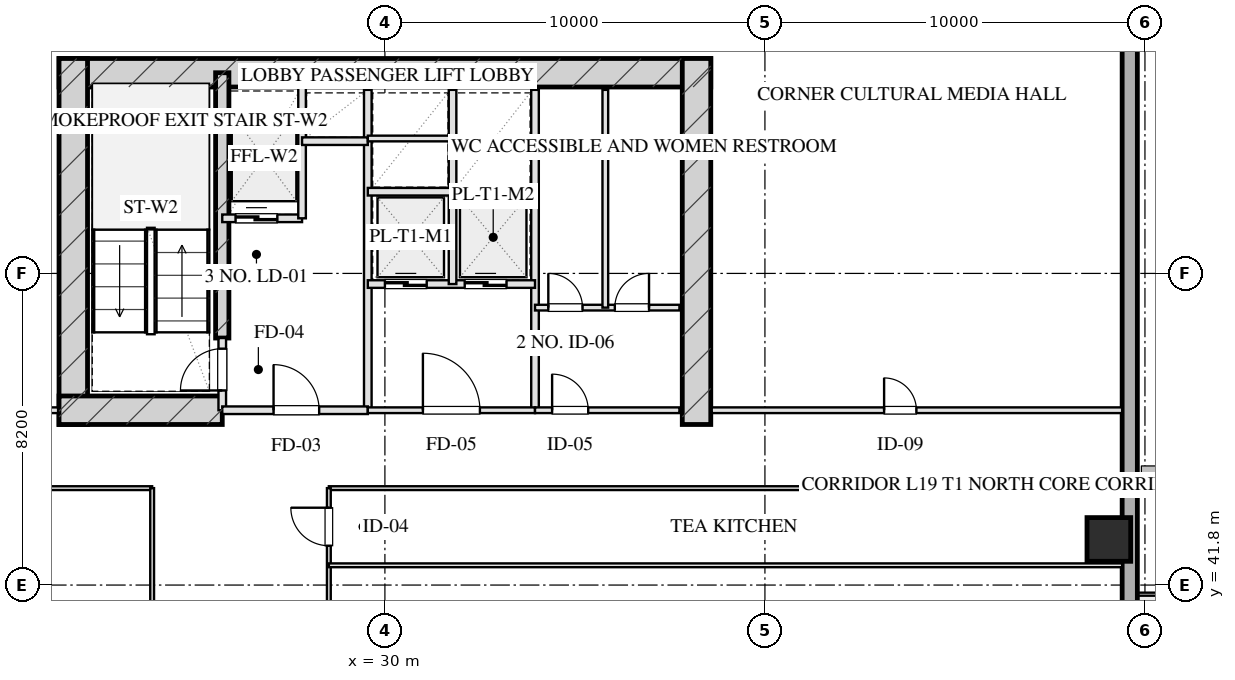
"""IFC4 building model, lengths in metres.
Left out: names, types, materials, properties, quantities, classifications, styles, units other than length and angle.
Written with IfcOpenShell. Run it as: python <this file> out.ifc"""

import sys

from ifc_helpers import new_model, si_unit, direction, frame, frame_2d, origin, origin_2d, place, context, subcontext, project, spatial, rectangle, hollow_rectangle, extrude, element, fill, save


model = new_model("IFC4")
c1 = context("Model", 3, precision=1e-05, world=origin(), true_north=direction((0.0, 1.0)))
c2 = subcontext(c1, "Body", "Model", "MODEL_VIEW")
j1 = project(units=[si_unit("LENGTHUNIT", "METRE"), si_unit("PLANEANGLEUNIT", "RADIAN")], contexts=[c1])
p1 = place(None, origin())
s1 = spatial("IfcSite", under=j1, at=p1, CompositionType="ELEMENT")
p2 = place(p1, origin())
s2 = spatial("IfcBuilding", under=s1, at=p2, CompositionType="ELEMENT")
p3 = place(p2, frame((0.0, 0.0, 78.2)))
s3 = spatial("IfcBuildingStorey", under=s2, at=p3, CompositionType="ELEMENT", Elevation=78.2)
p4 = place(p3, frame((21.425, 55.28, 0.0), z_axis=(0.0, 0.0, 1.0), x_axis=(1.0, 0.0, 0.0)))
e1 = element("IfcWall", 1, at=p4, inside=s3, PredefinedType="SHEAR", context=c2, shape_type="SweptSolid", body=[
    extrude(rectangle(XDim=17.15, YDim=0.75, at=frame_2d((8.575, 0.0))), origin(), (0.0, 0.0, 1.0), 3.45),
])
for number, where, z_axis, x_axis in (
    (2, (21.8, 46.025, 0.0), (0.0, 0.0, 1.0), (0.0, 1.0, 0.0)),
    (3, (38.2, 46.025, 0.0), (0.0, 0.0, 1.0), (0.0, 1.0, 0.0)),
):
    element("IfcWall", number, at=place(p3, frame(where, z_axis=z_axis, x_axis=x_axis)), inside=s3, PredefinedType="SHEAR", context=c2, shape_type="SweptSolid", body=[
        extrude(rectangle(XDim=9.63, YDim=0.75, at=frame_2d((4.815, 0.0))), origin(), (0.0, 0.0, 1.0), 3.45),
    ])
p5 = place(p3, frame((25.72, 48.3, 0.0), z_axis=(0.0, 0.0, 1.0), x_axis=(0.0, 1.0, 0.0)))
e4 = element("IfcWall", 4, at=p5, inside=s3, PredefinedType="SHEAR", context=c2, shape_type="SweptSolid", body=[
    extrude(rectangle(XDim=6.98, YDim=0.35, at=frame_2d((3.49, 0.0))), origin(), (0.0, 0.0, 1.0), 3.45),
])
p6 = place(p3, frame((21.425, 46.4, 0.0), z_axis=(0.0, 0.0, 1.0), x_axis=(1.0, 0.0, 0.0)))
e5 = element("IfcWall", 5, at=p6, inside=s3, PredefinedType="SHEAR", context=c2, shape_type="SweptSolid", body=[
    extrude(rectangle(XDim=4.295, YDim=0.75, at=frame_2d((2.147, 0.0))), origin(), (0.0, 0.0, 1.0), 3.45),
])
p7 = place(p3, frame((49.05, 43.0, 0.0), z_axis=(0.0, 0.0, 1.0), x_axis=(1.0, 0.0, 0.0)))
e6 = element("IfcColumn", 6, at=p7, inside=s3, PredefinedType="COLUMN", context=c2, shape_type="SweptSolid", body=[
    extrude(hollow_rectangle(XDim=1.15, YDim=1.15, WallThickness=0.04, at=origin_2d()), origin(), (0.0, 0.0, 1.0), 3.451),
])
p8 = place(p3, frame((49.6, 60.8, 0.0), z_axis=(0.0, 0.0, 1.0), x_axis=(0.0, -1.0, 0.0)))
e7 = element("IfcWall", 7, at=p8, inside=s3, PredefinedType="SOLIDWALL", context=c2, shape_type="SweptSolid", body=[
    extrude(rectangle(XDim=53.6, YDim=0.4, at=frame_2d((26.8, 0.0))), origin(), (0.0, 0.0, 1.0), 2.61),
])
p9 = place(p8, frame((20.45, 0.0, 0.0)))
e8 = element("IfcOpeningElement", 8, at=p9, cuts=e7, PredefinedType="OPENING", context=c2, shape_type="SweptSolid", body=[
    extrude(rectangle(XDim=1.1, YDim=2.15, at=frame_2d((0.55, 1.075))), frame((0.0, 0.21, 0.0), z_axis=(0.0, -1.0, 0.0), x_axis=(1.0, 0.0, 0.0)), (0.0, 0.0, 1.0), 0.42),
])
p10 = place(p3, frame((25.72, 46.4, 0.0), z_axis=(0.0, 0.0, 1.0), x_axis=(0.0, 1.0, 0.0)))
e9 = element("IfcWall", 9, at=p10, inside=s3, PredefinedType="PARTITIONING", context=c2, shape_type="SweptSolid", body=[
    extrude(rectangle(XDim=1.9, YDim=0.2, at=frame_2d((0.95, 0.0))), origin(), (0.0, 0.0, 1.0), 3.175),
])
p11 = place(p10, frame((0.52, 0.0, 0.0)))
e10 = element("IfcOpeningElement", 10, at=p11, cuts=e9, PredefinedType="OPENING", context=c2, shape_type="SweptSolid", body=[
    extrude(rectangle(XDim=1.1, YDim=2.05, at=frame_2d((0.55, 1.025))), frame((0.0, 0.11, 0.0), z_axis=(0.0, -1.0, 0.0), x_axis=(1.0, 0.0, 0.0)), (0.0, 0.0, 1.0), 0.22),
])
p12 = place(p3, frame((29.55, 46.4, 0.0), z_axis=(0.0, 0.0, 1.0), x_axis=(0.0, 1.0, 0.0)))
e11 = element("IfcWall", 11, at=p12, inside=s3, PredefinedType="PARTITIONING", context=c2, shape_type="SweptSolid", body=[
    extrude(rectangle(XDim=8.43, YDim=0.2, at=frame_2d((4.215, 0.0))), origin(), (0.0, 0.0, 1.0), 3.175),
])
p13 = place(p3, frame((25.72, 46.4, 0.0), z_axis=(0.0, 0.0, 1.0), x_axis=(1.0, 0.0, 0.0)))
e12 = element("IfcWall", 12, at=p13, inside=s3, PredefinedType="PARTITIONING", context=c2, shape_type="SweptSolid", body=[
    extrude(rectangle(XDim=3.83, YDim=0.2, at=frame_2d((1.915, 0.0))), origin(), (0.0, 0.0, 1.0), 3.175),
])
p14 = place(p13, frame((1.35, 0.0, 0.0)))
e13 = element("IfcOpeningElement", 13, at=p14, cuts=e12, PredefinedType="OPENING", context=c2, shape_type="SweptSolid", body=[
    extrude(rectangle(XDim=1.2, YDim=2.05, at=frame_2d((0.6, 1.025))), frame((0.0, 0.11, 0.0), z_axis=(0.0, -1.0, 0.0), x_axis=(1.0, 0.0, 0.0)), (0.0, 0.0, 1.0), 0.22),
])
p15 = place(p3, frame((25.72, 51.45, 0.0), z_axis=(0.0, 0.0, 1.0), x_axis=(1.0, 0.0, 0.0)))
e14 = element("IfcWall", 14, at=p15, inside=s3, PredefinedType="PARTITIONING", context=c2, shape_type="SweptSolid", body=[
    extrude(rectangle(XDim=2.1, YDim=0.2, at=frame_2d((1.05, 0.0))), origin(), (0.0, 0.0, 1.0), 3.175),
])
p16 = place(p15, frame((0.35, 0.0, 0.0)))
e15 = element("IfcOpeningElement", 15, at=p16, cuts=e14, PredefinedType="OPENING", context=c2, shape_type="SweptSolid", body=[
    extrude(rectangle(XDim=1.1, YDim=2.05, at=frame_2d((0.55, 1.025))), frame((0.0, 0.11, 0.0), z_axis=(0.0, -1.0, 0.0), x_axis=(1.0, 0.0, 0.0)), (0.0, 0.0, 1.0), 0.22),
])
p17 = place(p3, frame((27.82, 51.45, 0.0), z_axis=(0.0, 0.0, 1.0), x_axis=(0.0, 1.0, 0.0)))
e16 = element("IfcWall", 16, at=p17, inside=s3, PredefinedType="PARTITIONING", context=c2, shape_type="SweptSolid", body=[
    extrude(rectangle(XDim=3.7, YDim=0.2, at=frame_2d((1.85, 0.0))), origin(), (0.0, 0.0, 1.0), 3.175),
])
p18 = place(p3, frame((27.82, 53.48, 0.0), z_axis=(0.0, 0.0, 1.0), x_axis=(1.0, 0.0, 0.0)))
e17 = element("IfcWall", 17, at=p18, inside=s3, PredefinedType="PARTITIONING", context=c2, shape_type="SweptSolid", body=[
    extrude(rectangle(XDim=1.73, YDim=0.2, at=frame_2d((0.865, 0.0))), origin(), (0.0, 0.0, 1.0), 3.175),
])
p19 = place(p3, frame((33.95, 46.4, 0.0), z_axis=(0.0, 0.0, 1.0), x_axis=(0.0, 1.0, 0.0)))
e18 = element("IfcWall", 18, at=p19, inside=s3, PredefinedType="PARTITIONING", context=c2, shape_type="SweptSolid", body=[
    extrude(rectangle(XDim=8.43, YDim=0.2, at=frame_2d((4.215, 0.0))), origin(), (0.0, 0.0, 1.0), 3.175),
])
p20 = place(p3, frame((29.55, 46.4, 0.0), z_axis=(0.0, 0.0, 1.0), x_axis=(1.0, 0.0, 0.0)))
e19 = element("IfcWall", 19, at=p20, inside=s3, PredefinedType="PARTITIONING", context=c2, shape_type="SweptSolid", body=[
    extrude(rectangle(XDim=4.4, YDim=0.15, at=frame_2d((2.2, 0.0))), origin(), (0.0, 0.0, 1.0), 3.175),
])
p21 = place(p20, frame((1.45, 0.0, 0.0)))
e20 = element("IfcOpeningElement", 20, at=p21, cuts=e19, PredefinedType="OPENING", context=c2, shape_type="SweptSolid", body=[
    extrude(rectangle(XDim=1.5, YDim=2.05, at=frame_2d((0.75, 1.025))), frame((0.0, 0.085, 0.0), z_axis=(0.0, -1.0, 0.0), x_axis=(1.0, 0.0, 0.0)), (0.0, 0.0, 1.0), 0.17),
])
p22 = place(p3, frame((29.55, 49.72, 0.0), z_axis=(0.0, 0.0, 1.0), x_axis=(1.0, 0.0, 0.0)))
e21 = element("IfcWall", 21, at=p22, inside=s3, PredefinedType="PARTITIONING", context=c2, shape_type="SweptSolid", body=[
    extrude(rectangle(XDim=4.4, YDim=0.2, at=frame_2d((2.2, 0.0))), origin(), (0.0, 0.0, 1.0), 3.175),
])
p23 = place(p22, frame((0.45, 0.0, 0.0)))
e22 = element("IfcOpeningElement", 22, at=p23, cuts=e21, PredefinedType="OPENING", context=c2, shape_type="SweptSolid", body=[
    extrude(rectangle(XDim=1.1, YDim=2.05, at=frame_2d((0.55, 1.025))), frame((0.0, 0.11, 0.0), z_axis=(0.0, -1.0, 0.0), x_axis=(1.0, 0.0, 0.0)), (0.0, 0.0, 1.0), 0.22),
])
p24 = place(p22, frame((2.55, 0.0, 0.0)))
e23 = element("IfcOpeningElement", 23, at=p24, cuts=e21, PredefinedType="OPENING", context=c2, shape_type="SweptSolid", body=[
    extrude(rectangle(XDim=1.1, YDim=2.05, at=frame_2d((0.55, 1.025))), frame((0.0, 0.11, 0.0), z_axis=(0.0, -1.0, 0.0), x_axis=(1.0, 0.0, 0.0)), (0.0, 0.0, 1.0), 0.22),
])
p25 = place(p3, frame((31.78, 49.72, 0.0), z_axis=(0.0, 0.0, 1.0), x_axis=(0.0, 1.0, 0.0)))
e24 = element("IfcWall", 24, at=p25, inside=s3, PredefinedType="PARTITIONING", context=c2, shape_type="SweptSolid", body=[
    extrude(rectangle(XDim=5.11, YDim=0.2, at=frame_2d((2.555, 0.0))), origin(), (0.0, 0.0, 1.0), 3.175),
])
p26 = place(p3, frame((29.55, 52.15, 0.0), z_axis=(0.0, 0.0, 1.0), x_axis=(1.0, 0.0, 0.0)))
e25 = element("IfcWall", 25, at=p26, inside=s3, PredefinedType="PARTITIONING", context=c2, shape_type="SweptSolid", body=[
    extrude(rectangle(XDim=4.4, YDim=0.2, at=frame_2d((2.2, 0.0))), origin(), (0.0, 0.0, 1.0), 3.175),
])
p27 = place(p3, frame((29.55, 53.55, 0.0), z_axis=(0.0, 0.0, 1.0), x_axis=(1.0, 0.0, 0.0)))
e26 = element("IfcWall", 26, at=p27, inside=s3, PredefinedType="PARTITIONING", context=c2, shape_type="SweptSolid", body=[
    extrude(rectangle(XDim=2.23, YDim=0.15, at=frame_2d((1.115, 0.0))), origin(), (0.0, 0.0, 1.0), 3.175),
])
p28 = place(p3, frame((33.95, 46.4, 0.0), z_axis=(0.0, 0.0, 1.0), x_axis=(1.0, 0.0, 0.0)))
e27 = element("IfcWall", 27, at=p28, inside=s3, PredefinedType="PARTITIONING", context=c2, shape_type="SweptSolid", body=[
    extrude(rectangle(XDim=3.8, YDim=0.15, at=frame_2d((1.9, 0.0))), origin(), (0.0, 0.0, 1.0), 3.175),
])
p29 = place(p28, frame((0.45, 0.0, 0.0)))
e28 = element("IfcOpeningElement", 28, at=p29, cuts=e27, PredefinedType="OPENING", context=c2, shape_type="SweptSolid", body=[
    extrude(rectangle(XDim=0.95, YDim=2.05, at=frame_2d((0.475, 1.025))), frame((0.0, 0.085, 0.0), z_axis=(0.0, -1.0, 0.0), x_axis=(1.0, 0.0, 0.0)), (0.0, 0.0, 1.0), 0.17),
])
p30 = place(p3, frame((33.95, 49.1, 0.0), z_axis=(0.0, 0.0, 1.0), x_axis=(1.0, 0.0, 0.0)))
e29 = element("IfcWall", 29, at=p30, inside=s3, PredefinedType="PARTITIONING", context=c2, shape_type="SweptSolid", body=[
    extrude(rectangle(XDim=3.8, YDim=0.15, at=frame_2d((1.9, 0.0))), origin(), (0.0, 0.0, 1.0), 3.175),
])
p31 = place(p30, frame((0.35, 0.0, 0.0)))
e30 = element("IfcOpeningElement", 30, at=p31, cuts=e29, PredefinedType="OPENING", context=c2, shape_type="SweptSolid", body=[
    extrude(rectangle(XDim=0.9, YDim=2.05, at=frame_2d((0.45, 1.025))), frame((0.0, 0.085, 0.0), z_axis=(0.0, -1.0, 0.0), x_axis=(1.0, 0.0, 0.0)), (0.0, 0.0, 1.0), 0.17),
])
p32 = place(p30, frame((2.1, 0.0, 0.0)))
e31 = element("IfcOpeningElement", 31, at=p32, cuts=e29, PredefinedType="OPENING", context=c2, shape_type="SweptSolid", body=[
    extrude(rectangle(XDim=0.9, YDim=2.05, at=frame_2d((0.45, 1.025))), frame((0.0, 0.085, 0.0), z_axis=(0.0, -1.0, 0.0), x_axis=(1.0, 0.0, 0.0)), (0.0, 0.0, 1.0), 0.17),
])
p33 = place(p3, frame((35.8, 49.1, 0.0), z_axis=(0.0, 0.0, 1.0), x_axis=(0.0, 1.0, 0.0)))
e32 = element("IfcWall", 32, at=p33, inside=s3, PredefinedType="PARTITIONING", context=c2, shape_type="SweptSolid", body=[
    extrude(rectangle(XDim=5.73, YDim=0.15, at=frame_2d((2.865, 0.0))), origin(), (0.0, 0.0, 1.0), 3.175),
])
p34 = place(p3, frame((10.6, 46.4, 0.0), z_axis=(0.0, 0.0, 1.0), x_axis=(1.0, 0.0, 0.0)))
e33 = element("IfcWall", 33, at=p34, inside=s3, PredefinedType="PARTITIONING", context=c2, shape_type="SweptSolid", body=[
    extrude(rectangle(XDim=10.8, YDim=0.15, at=frame_2d((5.4, 0.0))), origin(), (0.0, 0.0, 1.0), 3.175),
])
p35 = place(p34, frame((4.536, 0.0, 0.0)))
e34 = element("IfcOpeningElement", 34, at=p35, cuts=e33, PredefinedType="OPENING", context=c2, shape_type="SweptSolid", body=[
    extrude(rectangle(XDim=1.0, YDim=2.05, at=frame_2d((0.5, 1.025))), frame((0.0, 0.085, 0.0), z_axis=(0.0, -1.0, 0.0), x_axis=(1.0, 0.0, 0.0)), (0.0, 0.0, 1.0), 0.17),
])
p36 = place(p3, frame((38.6, 46.4, 0.0), z_axis=(0.0, 0.0, 1.0), x_axis=(1.0, 0.0, 0.0)))
e35 = element("IfcWall", 35, at=p36, inside=s3, PredefinedType="PARTITIONING", context=c2, shape_type="SweptSolid", body=[
    extrude(rectangle(XDim=10.8, YDim=0.15, at=frame_2d((5.4, 0.0))), origin(), (0.0, 0.0, 1.0), 3.175),
])
p37 = place(p36, frame((4.536, 0.0, 0.0)))
e36 = element("IfcOpeningElement", 36, at=p37, cuts=e35, PredefinedType="OPENING", context=c2, shape_type="SweptSolid", body=[
    extrude(rectangle(XDim=0.85, YDim=2.05, at=frame_2d((0.425, 1.025))), frame((0.0, 0.085, 0.0), z_axis=(0.0, -1.0, 0.0), x_axis=(1.0, 0.0, 0.0)), (0.0, 0.0, 1.0), 0.17),
])
p38 = place(p3, frame((10.6, 44.35, 0.0), z_axis=(0.0, 0.0, 1.0), x_axis=(1.0, 0.0, 0.0)))
e37 = element("IfcWall", 37, at=p38, inside=s3, PredefinedType="MOVABLE", context=c2, shape_type="SweptSolid", body=[
    extrude(rectangle(XDim=13.275, YDim=0.1, at=frame_2d((6.637, 0.0))), origin(), (0.0, 0.0, 1.0), 3.175),
])
p39 = place(p3, frame((28.525, 44.35, 0.0), z_axis=(0.0, 0.0, 1.0), x_axis=(1.0, 0.0, 0.0)))
e38 = element("IfcWall", 38, at=p39, inside=s3, PredefinedType="MOVABLE", context=c2, shape_type="SweptSolid", body=[
    extrude(rectangle(XDim=20.875, YDim=0.1, at=frame_2d((10.438, 0.0))), origin(), (0.0, 0.0, 1.0), 3.175),
])
p40 = place(p3, frame((23.875, 23.65, 0.0), z_axis=(0.0, 0.0, 1.0), x_axis=(0.0, 1.0, 0.0)))
e39 = element("IfcWall", 39, at=p40, inside=s3, PredefinedType="MOVABLE", context=c2, shape_type="SweptSolid", body=[
    extrude(rectangle(XDim=20.7, YDim=0.1, at=frame_2d((10.35, 0.0))), origin(), (0.0, 0.0, 1.0), 3.175),
])
p41 = place(p40, frame((4.075, 0.0, 0.0)))
e40 = element("IfcOpeningElement", 40, at=p41, cuts=e39, PredefinedType="OPENING", context=c2, shape_type="SweptSolid", body=[
    extrude(rectangle(XDim=1.0, YDim=2.05, at=frame_2d((0.5, 1.025))), frame((0.0, 0.06, 0.0), z_axis=(0.0, -1.0, 0.0), x_axis=(1.0, 0.0, 0.0)), (0.0, 0.0, 1.0), 0.12),
])
p42 = place(p40, frame((14.425, 0.0, 0.0)))
e41 = element("IfcOpeningElement", 41, at=p42, cuts=e39, PredefinedType="OPENING", context=c2, shape_type="SweptSolid", body=[
    extrude(rectangle(XDim=1.0, YDim=2.05, at=frame_2d((0.5, 1.025))), frame((0.0, 0.06, 0.0), z_axis=(0.0, -1.0, 0.0), x_axis=(1.0, 0.0, 0.0)), (0.0, 0.0, 1.0), 0.12),
])
p43 = place(p3, frame((28.525, 23.65, 0.0), z_axis=(0.0, 0.0, 1.0), x_axis=(0.0, 1.0, 0.0)))
e42 = element("IfcWall", 42, at=p43, inside=s3, PredefinedType="MOVABLE", context=c2, shape_type="SweptSolid", body=[
    extrude(rectangle(XDim=20.7, YDim=0.1, at=frame_2d((10.35, 0.0))), origin(), (0.0, 0.0, 1.0), 3.175),
])
p44 = place(p43, frame((0.775, 0.0, 0.0)))
e43 = element("IfcOpeningElement", 43, at=p44, cuts=e42, PredefinedType="OPENING", context=c2, shape_type="SweptSolid", body=[
    extrude(rectangle(XDim=1.05, YDim=2.05, at=frame_2d((0.525, 1.025))), frame((0.0, 0.06, 0.0), z_axis=(0.0, -1.0, 0.0), x_axis=(1.0, 0.0, 0.0)), (0.0, 0.0, 1.0), 0.12),
])
p45 = place(p43, frame((3.95, 0.0, 0.0)))
e44 = element("IfcOpeningElement", 44, at=p45, cuts=e42, PredefinedType="OPENING", context=c2, shape_type="SweptSolid", body=[
    extrude(rectangle(XDim=1.0, YDim=2.05, at=frame_2d((0.5, 1.025))), frame((0.0, 0.06, 0.0), z_axis=(0.0, -1.0, 0.0), x_axis=(1.0, 0.0, 0.0)), (0.0, 0.0, 1.0), 0.12),
])
p46 = place(p43, frame((7.51, 0.0, 0.0)))
e45 = element("IfcOpeningElement", 45, at=p46, cuts=e42, PredefinedType="OPENING", context=c2, shape_type="SweptSolid", body=[
    extrude(rectangle(XDim=1.0, YDim=2.05, at=frame_2d((0.5, 1.025))), frame((0.0, 0.06, 0.0), z_axis=(0.0, -1.0, 0.0), x_axis=(1.0, 0.0, 0.0)), (0.0, 0.0, 1.0), 0.12),
])
p47 = place(p43, frame((11.51, 0.0, 0.0)))
e46 = element("IfcOpeningElement", 46, at=p47, cuts=e42, PredefinedType="OPENING", context=c2, shape_type="SweptSolid", body=[
    extrude(rectangle(XDim=1.0, YDim=2.05, at=frame_2d((0.5, 1.025))), frame((0.0, 0.06, 0.0), z_axis=(0.0, -1.0, 0.0), x_axis=(1.0, 0.0, 0.0)), (0.0, 0.0, 1.0), 0.12),
])
p48 = place(p43, frame((15.75, 0.0, 0.0)))
e47 = element("IfcOpeningElement", 47, at=p48, cuts=e42, PredefinedType="OPENING", context=c2, shape_type="SweptSolid", body=[
    extrude(rectangle(XDim=1.0, YDim=2.05, at=frame_2d((0.5, 1.025))), frame((0.0, 0.06, 0.0), z_axis=(0.0, -1.0, 0.0), x_axis=(1.0, 0.0, 0.0)), (0.0, 0.0, 1.0), 0.12),
])
p49 = place(p43, frame((19.185, 0.0, 0.0)))
e48 = element("IfcOpeningElement", 48, at=p49, cuts=e42, PredefinedType="OPENING", context=c2, shape_type="SweptSolid", body=[
    extrude(rectangle(XDim=1.0, YDim=2.05, at=frame_2d((0.5, 1.025))), frame((0.0, 0.06, 0.0), z_axis=(0.0, -1.0, 0.0), x_axis=(1.0, 0.0, 0.0)), (0.0, 0.0, 1.0), 0.12),
])
p50 = place(p3, frame((28.525, 42.32, 0.0), z_axis=(0.0, 0.0, 1.0), x_axis=(1.0, 0.0, 0.0)))
e49 = element("IfcWall", 49, at=p50, inside=s3, PredefinedType="MOVABLE", context=c2, shape_type="SweptSolid", body=[
    extrude(rectangle(XDim=20.875, YDim=0.1, at=frame_2d((10.438, 0.0))), origin(), (0.0, 0.0, 1.0), 3.175),
])
p51 = place(p11, origin())
e50 = element("IfcDoor", 50, at=p51, inside=s3, OperationType="SINGLE_SWING_LEFT", PredefinedType="DOOR", context=c2, shape_type="SweptSolid", body=[
    extrude(rectangle(XDim=1.1, YDim=2.05, at=frame_2d((0.55, 1.025))), frame((0.0, 0.025, 0.0), z_axis=(0.0, -1.0, 0.0), x_axis=(1.0, 0.0, 0.0)), (0.0, 0.0, 1.0), 0.05),
])
fill(e10, e50)
p52 = place(p14, origin())
e51 = element("IfcDoor", 51, at=p52, inside=s3, OperationType="SINGLE_SWING_LEFT", PredefinedType="DOOR", context=c2, shape_type="SweptSolid", body=[
    extrude(rectangle(XDim=1.2, YDim=2.05, at=frame_2d((0.6, 1.025))), frame((0.0, 0.025, 0.0), z_axis=(0.0, -1.0, 0.0), x_axis=(1.0, 0.0, 0.0)), (0.0, 0.0, 1.0), 0.05),
])
fill(e13, e51)
p53 = place(p16, origin())
e52 = element("IfcDoor", 52, at=p53, inside=s3, OperationType="DOUBLE_DOOR_SLIDING", PredefinedType="DOOR", context=c2, shape_type="SweptSolid", body=[
    extrude(rectangle(XDim=1.1, YDim=2.05, at=frame_2d((0.55, 1.025))), frame((0.0, 0.025, 0.0), z_axis=(0.0, -1.0, 0.0), x_axis=(1.0, 0.0, 0.0)), (0.0, 0.0, 1.0), 0.05),
])
fill(e15, e52)
p54 = place(p21, origin())
e53 = element("IfcDoor", 53, at=p54, inside=s3, OperationType="SINGLE_SWING_LEFT", PredefinedType="DOOR", context=c2, shape_type="SweptSolid", body=[
    extrude(rectangle(XDim=1.5, YDim=2.05, at=frame_2d((0.75, 1.025))), frame((0.0, 0.025, 0.0), z_axis=(0.0, -1.0, 0.0), x_axis=(1.0, 0.0, 0.0)), (0.0, 0.0, 1.0), 0.05),
])
fill(e20, e53)
p55 = place(p23, origin())
e54 = element("IfcDoor", 54, at=p55, inside=s3, OperationType="DOUBLE_DOOR_SLIDING", PredefinedType="DOOR", context=c2, shape_type="SweptSolid", body=[
    extrude(rectangle(XDim=1.1, YDim=2.05, at=frame_2d((0.55, 1.025))), frame((0.0, 0.025, 0.0), z_axis=(0.0, -1.0, 0.0), x_axis=(1.0, 0.0, 0.0)), (0.0, 0.0, 1.0), 0.05),
])
fill(e22, e54)
p56 = place(p24, origin())
e55 = element("IfcDoor", 55, at=p56, inside=s3, OperationType="DOUBLE_DOOR_SLIDING", PredefinedType="DOOR", context=c2, shape_type="SweptSolid", body=[
    extrude(rectangle(XDim=1.1, YDim=2.05, at=frame_2d((0.55, 1.025))), frame((0.0, 0.025, 0.0), z_axis=(0.0, -1.0, 0.0), x_axis=(1.0, 0.0, 0.0)), (0.0, 0.0, 1.0), 0.05),
])
fill(e23, e55)
p57 = place(p29, origin())
e56 = element("IfcDoor", 56, at=p57, inside=s3, OperationType="SINGLE_SWING_LEFT", PredefinedType="DOOR", context=c2, shape_type="SweptSolid", body=[
    extrude(rectangle(XDim=0.95, YDim=2.05, at=frame_2d((0.475, 1.025))), frame((0.0, 0.025, 0.0), z_axis=(0.0, -1.0, 0.0), x_axis=(1.0, 0.0, 0.0)), (0.0, 0.0, 1.0), 0.05),
])
fill(e28, e56)
p58 = place(p31, origin())
e57 = element("IfcDoor", 57, at=p58, inside=s3, OperationType="SINGLE_SWING_LEFT", PredefinedType="DOOR", context=c2, shape_type="SweptSolid", body=[
    extrude(rectangle(XDim=0.9, YDim=2.05, at=frame_2d((0.45, 1.025))), frame((0.0, 0.025, 0.0), z_axis=(0.0, -1.0, 0.0), x_axis=(1.0, 0.0, 0.0)), (0.0, 0.0, 1.0), 0.05),
])
fill(e30, e57)
p59 = place(p32, origin())
e58 = element("IfcDoor", 58, at=p59, inside=s3, OperationType="SINGLE_SWING_RIGHT", PredefinedType="DOOR", context=c2, shape_type="SweptSolid", body=[
    extrude(rectangle(XDim=0.9, YDim=2.05, at=frame_2d((0.45, 1.025))), frame((0.0, 0.025, 0.0), z_axis=(0.0, -1.0, 0.0), x_axis=(1.0, 0.0, 0.0)), (0.0, 0.0, 1.0), 0.05),
])
fill(e31, e58)
p60 = place(p37, origin())
e59 = element("IfcDoor", 59, at=p60, inside=s3, OperationType="SINGLE_SWING_LEFT", PredefinedType="DOOR", context=c2, shape_type="SweptSolid", body=[
    extrude(rectangle(XDim=0.85, YDim=2.05, at=frame_2d((0.425, 1.025))), frame((0.0, 0.025, 0.0), z_axis=(0.0, -1.0, 0.0), x_axis=(1.0, 0.0, 0.0)), (0.0, 0.0, 1.0), 0.05),
])
fill(e36, e59)
p61 = place(p49, origin())
e60 = element("IfcDoor", 60, at=p61, inside=s3, OperationType="SINGLE_SWING_RIGHT", PredefinedType="DOOR", context=c2, shape_type="SweptSolid", body=[
    extrude(rectangle(XDim=1.0, YDim=2.05, at=frame_2d((0.5, 1.025))), frame((0.0, 0.025, 0.0), z_axis=(0.0, -1.0, 0.0), x_axis=(1.0, 0.0, 0.0)), (0.0, 0.0, 1.0), 0.05),
])
fill(e48, e60)
save(model, sys.argv[1])
